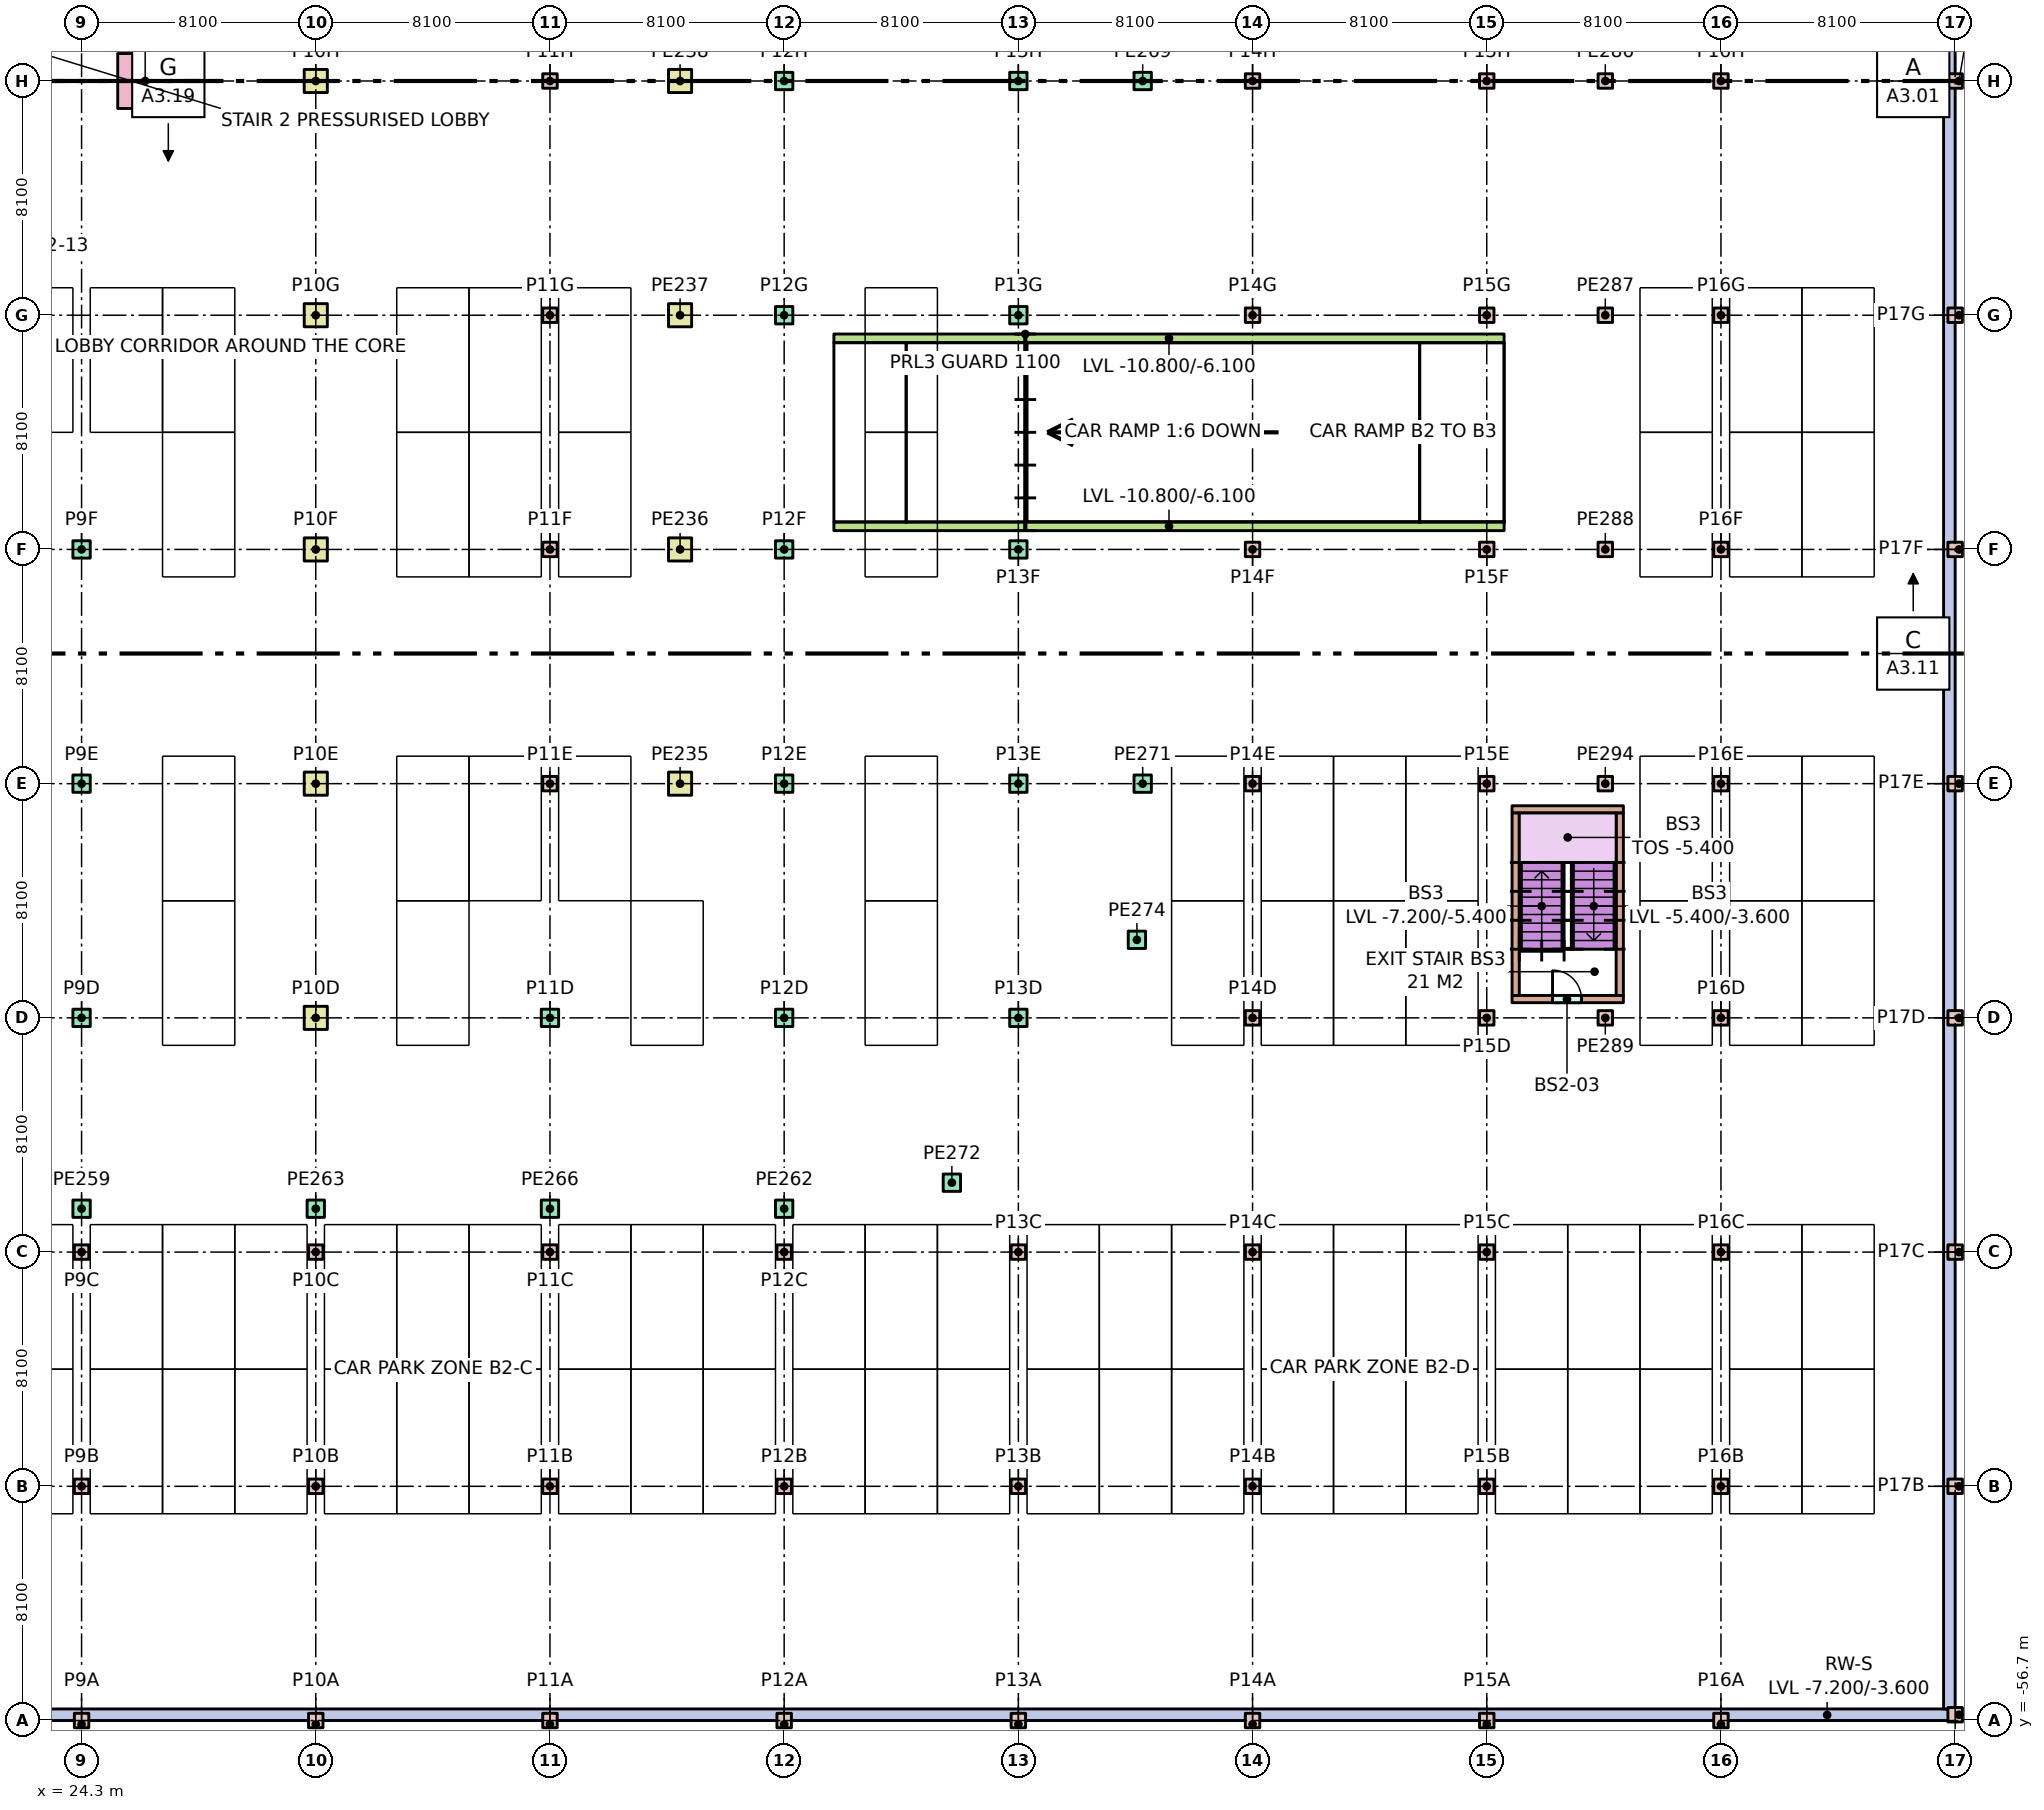
"""IFC4 building model, lengths in metres.
Left out: names, types, materials, properties, quantities, classifications, styles, units other than length and angle.
Written with IfcOpenShell. Run it as: python <this file> out.ifc"""

import sys

from ifc_helpers import new_model, si_unit, direction, frame, frame_2d, origin, origin_2d, place, context, subcontext, project, spatial, polyline, rectangle, outline, extrude, element, fill, save


model = new_model("IFC4")
c1 = context("Model", 3, precision=1e-05, world=origin(), true_north=direction((0.0, 1.0)))
c2 = subcontext(c1, "Body", "Model", "MODEL_VIEW")
j1 = project(units=[si_unit("LENGTHUNIT", "METRE"), si_unit("PLANEANGLEUNIT", "RADIAN")], contexts=[c1])
p1 = place(None, origin())
s1 = spatial("IfcSite", under=j1, at=p1, CompositionType="ELEMENT")
p2 = place(p1, origin())
s2 = spatial("IfcBuilding", under=s1, at=p2, CompositionType="ELEMENT")
p3 = place(p2, frame((0.0, 0.0, -7.2)))
s3 = spatial("IfcBuildingStorey", under=s2, at=p3, CompositionType="ELEMENT", Elevation=-7.2)
p4 = place(p3, frame((-40.5, -56.5, 0.0), z_axis=(0.0, 0.0, 1.0), x_axis=(1.0, 0.0, 0.0)))
e1 = element("IfcWall", 1, at=p4, inside=s3, PredefinedType="SOLIDWALL", context=c2, shape_type="SweptSolid", body=[
    extrude(rectangle(XDim=129.6, YDim=0.4, at=frame_2d((64.8, 0.0))), origin(), (0.0, 0.0, 1.0), 3.6),
])
p5 = place(p3, frame((88.9, -56.3, 0.0), z_axis=(0.0, 0.0, 1.0), x_axis=(0.0, 1.0, 0.0)))
e2 = element("IfcWall", 2, at=p5, inside=s3, PredefinedType="SOLIDWALL", context=c2, shape_type="SweptSolid", body=[
    extrude(rectangle(XDim=112.6, YDim=0.4, at=frame_2d((56.3, 0.0))), origin(), (0.0, 0.0, 1.0), 3.6),
])
for number, where, z_axis, x_axis in (
    (3, (24.3, -56.7, 0.0), (0.0, 0.0, 1.0), (1.0, 0.0, 0.0)),
    (4, (24.3, -48.6, 0.0), (0.0, 0.0, 1.0), (1.0, 0.0, 0.0)),
    (5, (24.3, -40.5, 0.0), (0.0, 0.0, 1.0), (1.0, 0.0, 0.0)),
):
    element("IfcColumn", number, at=place(p3, frame(where, z_axis=z_axis, x_axis=x_axis)), inside=s3, PredefinedType="COLUMN", context=c2, shape_type="SweptSolid", body=[
        extrude(rectangle(XDim=0.5, YDim=0.5, at=origin_2d()), origin(), (0.0, 0.0, 1.0), 3.6),
    ])
for number, where, z_axis, x_axis in (
    (6, (24.3, -32.4, 0.0), (0.0, 0.0, 1.0), (1.0, 0.0, 0.0)),
    (7, (24.3, -24.3, 0.0), (0.0, 0.0, 1.0), (1.0, 0.0, 0.0)),
    (8, (24.3, -16.2, 0.0), (0.0, 0.0, 1.0), (1.0, 0.0, 0.0)),
):
    element("IfcColumn", number, at=place(p3, frame(where, z_axis=z_axis, x_axis=x_axis)), inside=s3, PredefinedType="COLUMN", context=c2, shape_type="SweptSolid", body=[
        extrude(rectangle(XDim=0.6, YDim=0.6, at=origin_2d()), origin(), (0.0, 0.0, 1.0), 3.6),
    ])
for number, where, z_axis, x_axis in (
    (9, (32.4, -56.7, 0.0), (0.0, 0.0, 1.0), (1.0, 0.0, 0.0)),
    (10, (32.4, -48.6, 0.0), (0.0, 0.0, 1.0), (1.0, 0.0, 0.0)),
    (11, (32.4, -40.5, 0.0), (0.0, 0.0, 1.0), (1.0, 0.0, 0.0)),
):
    element("IfcColumn", number, at=place(p3, frame(where, z_axis=z_axis, x_axis=x_axis)), inside=s3, PredefinedType="COLUMN", context=c2, shape_type="SweptSolid", body=[
        extrude(rectangle(XDim=0.5, YDim=0.5, at=origin_2d()), origin(), (0.0, 0.0, 1.0), 3.6),
    ])
for number, where, z_axis, x_axis in (
    (12, (32.4, -32.4, 0.0), (0.0, 0.0, 1.0), (1.0, 0.0, 0.0)),
    (13, (32.4, -24.3, 0.0), (0.0, 0.0, 1.0), (1.0, 0.0, 0.0)),
    (14, (32.4, -16.2, 0.0), (0.0, 0.0, 1.0), (1.0, 0.0, 0.0)),
    (15, (32.4, -8.1, 0.0), (0.0, 0.0, 1.0), (1.0, 0.0, 0.0)),
    (16, (32.4, 0.0, 0.0), (0.0, 0.0, 1.0), (1.0, 0.0, 0.0)),
):
    element("IfcColumn", number, at=place(p3, frame(where, z_axis=z_axis, x_axis=x_axis)), inside=s3, PredefinedType="COLUMN", context=c2, shape_type="SweptSolid", body=[
        extrude(rectangle(XDim=0.8, YDim=0.8, at=origin_2d()), origin(), (0.0, 0.0, 1.0), 3.6),
    ])
for number, where, z_axis, x_axis in (
    (17, (40.5, -56.7, 0.0), (0.0, 0.0, 1.0), (1.0, 0.0, 0.0)),
    (18, (40.5, -48.6, 0.0), (0.0, 0.0, 1.0), (1.0, 0.0, 0.0)),
    (19, (40.5, -40.5, 0.0), (0.0, 0.0, 1.0), (1.0, 0.0, 0.0)),
):
    element("IfcColumn", number, at=place(p3, frame(where, z_axis=z_axis, x_axis=x_axis)), inside=s3, PredefinedType="COLUMN", context=c2, shape_type="SweptSolid", body=[
        extrude(rectangle(XDim=0.5, YDim=0.5, at=origin_2d()), origin(), (0.0, 0.0, 1.0), 3.6),
    ])
p6 = place(p3, frame((40.5, -32.4, 0.0), z_axis=(0.0, 0.0, 1.0), x_axis=(1.0, 0.0, 0.0)))
e20 = element("IfcColumn", 20, at=p6, inside=s3, PredefinedType="COLUMN", context=c2, shape_type="SweptSolid", body=[
    extrude(rectangle(XDim=0.6, YDim=0.6, at=origin_2d()), origin(), (0.0, 0.0, 1.0), 3.6),
])
for number, where, z_axis, x_axis in (
    (21, (40.5, -24.3, 0.0), (0.0, 0.0, 1.0), (1.0, 0.0, 0.0)),
    (22, (40.5, -16.2, 0.0), (0.0, 0.0, 1.0), (1.0, 0.0, 0.0)),
    (23, (40.5, -8.1, 0.0), (0.0, 0.0, 1.0), (1.0, 0.0, 0.0)),
    (24, (40.5, 0.0, 0.0), (0.0, 0.0, 1.0), (1.0, 0.0, 0.0)),
    (25, (48.6, -56.7, 0.0), (0.0, 0.0, 1.0), (1.0, 0.0, 0.0)),
    (26, (48.6, -48.6, 0.0), (0.0, 0.0, 1.0), (1.0, 0.0, 0.0)),
    (27, (48.6, -40.5, 0.0), (0.0, 0.0, 1.0), (1.0, 0.0, 0.0)),
):
    element("IfcColumn", number, at=place(p3, frame(where, z_axis=z_axis, x_axis=x_axis)), inside=s3, PredefinedType="COLUMN", context=c2, shape_type="SweptSolid", body=[
        extrude(rectangle(XDim=0.5, YDim=0.5, at=origin_2d()), origin(), (0.0, 0.0, 1.0), 3.6),
    ])
for number, where, z_axis, x_axis in (
    (28, (48.6, -32.4, 0.0), (0.0, 0.0, 1.0), (1.0, 0.0, 0.0)),
    (29, (48.6, -24.3, 0.0), (0.0, 0.0, 1.0), (1.0, 0.0, 0.0)),
    (30, (48.6, -16.2, 0.0), (0.0, 0.0, 1.0), (1.0, 0.0, 0.0)),
    (31, (48.6, -8.1, 0.0), (0.0, 0.0, 1.0), (1.0, 0.0, 0.0)),
    (32, (48.6, 0.0, 0.0), (0.0, 0.0, 1.0), (1.0, 0.0, 0.0)),
):
    element("IfcColumn", number, at=place(p3, frame(where, z_axis=z_axis, x_axis=x_axis)), inside=s3, PredefinedType="COLUMN", context=c2, shape_type="SweptSolid", body=[
        extrude(rectangle(XDim=0.6, YDim=0.6, at=origin_2d()), origin(), (0.0, 0.0, 1.0), 3.6),
    ])
for number, where, z_axis, x_axis in (
    (33, (56.7, -56.7, 0.0), (0.0, 0.0, 1.0), (1.0, 0.0, 0.0)),
    (34, (56.7, -48.6, 0.0), (0.0, 0.0, 1.0), (1.0, 0.0, 0.0)),
    (35, (56.7, -40.5, 0.0), (0.0, 0.0, 1.0), (1.0, 0.0, 0.0)),
):
    element("IfcColumn", number, at=place(p3, frame(where, z_axis=z_axis, x_axis=x_axis)), inside=s3, PredefinedType="COLUMN", context=c2, shape_type="SweptSolid", body=[
        extrude(rectangle(XDim=0.5, YDim=0.5, at=origin_2d()), origin(), (0.0, 0.0, 1.0), 3.6),
    ])
for number, where, z_axis, x_axis in (
    (36, (56.7, -32.4, 0.0), (0.0, 0.0, 1.0), (1.0, 0.0, 0.0)),
    (37, (56.7, -24.3, 0.0), (0.0, 0.0, 1.0), (1.0, 0.0, 0.0)),
    (38, (56.7, -16.2, 0.0), (0.0, 0.0, 1.0), (1.0, 0.0, 0.0)),
    (39, (56.7, -8.1, 0.0), (0.0, 0.0, 1.0), (1.0, 0.0, 0.0)),
    (40, (56.7, 0.0, 0.0), (0.0, 0.0, 1.0), (1.0, 0.0, 0.0)),
):
    element("IfcColumn", number, at=place(p3, frame(where, z_axis=z_axis, x_axis=x_axis)), inside=s3, PredefinedType="COLUMN", context=c2, shape_type="SweptSolid", body=[
        extrude(rectangle(XDim=0.6, YDim=0.6, at=origin_2d()), origin(), (0.0, 0.0, 1.0), 3.6),
    ])
for number, where, z_axis, x_axis in (
    (41, (64.8, -56.7, 0.0), (0.0, 0.0, 1.0), (1.0, 0.0, 0.0)),
    (42, (64.8, -48.6, 0.0), (0.0, 0.0, 1.0), (1.0, 0.0, 0.0)),
    (43, (64.8, -40.5, 0.0), (0.0, 0.0, 1.0), (1.0, 0.0, 0.0)),
    (44, (64.8, -32.4, 0.0), (0.0, 0.0, 1.0), (1.0, 0.0, 0.0)),
    (45, (64.8, -24.3, 0.0), (0.0, 0.0, 1.0), (1.0, 0.0, 0.0)),
    (46, (64.8, -16.2, 0.0), (0.0, 0.0, 1.0), (1.0, 0.0, 0.0)),
    (47, (64.8, -8.1, 0.0), (0.0, 0.0, 1.0), (1.0, 0.0, 0.0)),
    (48, (64.8, 0.0, 0.0), (0.0, 0.0, 1.0), (1.0, 0.0, 0.0)),
    (49, (72.9, -56.7, 0.0), (0.0, 0.0, 1.0), (1.0, 0.0, 0.0)),
    (50, (72.9, -48.6, 0.0), (0.0, 0.0, 1.0), (1.0, 0.0, 0.0)),
    (51, (72.9, -40.5, 0.0), (0.0, 0.0, 1.0), (1.0, 0.0, 0.0)),
    (52, (72.9, -32.4, 0.0), (0.0, 0.0, 1.0), (1.0, 0.0, 0.0)),
    (53, (72.9, -24.3, 0.0), (0.0, 0.0, 1.0), (1.0, 0.0, 0.0)),
    (54, (72.9, -16.2, 0.0), (0.0, 0.0, 1.0), (1.0, 0.0, 0.0)),
    (55, (72.9, -8.1, 0.0), (0.0, 0.0, 1.0), (1.0, 0.0, 0.0)),
    (56, (72.9, 0.0, 0.0), (0.0, 0.0, 1.0), (1.0, 0.0, 0.0)),
    (57, (81.0, -56.7, 0.0), (0.0, 0.0, 1.0), (1.0, 0.0, 0.0)),
    (58, (81.0, -48.6, 0.0), (0.0, 0.0, 1.0), (1.0, 0.0, 0.0)),
    (59, (81.0, -40.5, 0.0), (0.0, 0.0, 1.0), (1.0, 0.0, 0.0)),
    (60, (81.0, -32.4, 0.0), (0.0, 0.0, 1.0), (1.0, 0.0, 0.0)),
    (61, (81.0, -24.3, 0.0), (0.0, 0.0, 1.0), (1.0, 0.0, 0.0)),
    (62, (81.0, -16.2, 0.0), (0.0, 0.0, 1.0), (1.0, 0.0, 0.0)),
    (63, (81.0, -8.1, 0.0), (0.0, 0.0, 1.0), (1.0, 0.0, 0.0)),
    (64, (81.0, 0.0, 0.0), (0.0, 0.0, 1.0), (1.0, 0.0, 0.0)),
    (65, (89.1, -56.5, 0.0), (0.0, 0.0, 1.0), (1.0, 0.0, 0.0)),
    (66, (89.1, -48.6, 0.0), (0.0, 0.0, 1.0), (1.0, 0.0, 0.0)),
    (67, (89.1, -40.5, 0.0), (0.0, 0.0, 1.0), (1.0, 0.0, 0.0)),
    (68, (89.1, -32.4, 0.0), (0.0, 0.0, 1.0), (1.0, 0.0, 0.0)),
    (69, (89.1, -24.3, 0.0), (0.0, 0.0, 1.0), (1.0, 0.0, 0.0)),
    (70, (89.1, -16.2, 0.0), (0.0, 0.0, 1.0), (1.0, 0.0, 0.0)),
    (71, (89.1, -8.1, 0.0), (0.0, 0.0, 1.0), (1.0, 0.0, 0.0)),
    (72, (89.1, 0.0, 0.0), (0.0, 0.0, 1.0), (1.0, 0.0, 0.0)),
):
    element("IfcColumn", number, at=place(p3, frame(where, z_axis=z_axis, x_axis=x_axis)), inside=s3, PredefinedType="COLUMN", context=c2, shape_type="SweptSolid", body=[
        extrude(rectangle(XDim=0.5, YDim=0.5, at=origin_2d()), origin(), (0.0, 0.0, 1.0), 3.6),
    ])
for number, where, z_axis, x_axis in (
    (73, (45.0, -24.3, 0.0), (0.0, 0.0, 1.0), (1.0, 0.0, 0.0)),
    (74, (45.0, -16.2, 0.0), (0.0, 0.0, 1.0), (1.0, 0.0, 0.0)),
    (75, (45.0, -8.1, 0.0), (0.0, 0.0, 1.0), (1.0, 0.0, 0.0)),
    (76, (45.0, 0.0, 0.0), (0.0, 0.0, 1.0), (1.0, 0.0, 0.0)),
):
    element("IfcColumn", number, at=place(p3, frame(where, z_axis=z_axis, x_axis=x_axis)), inside=s3, PredefinedType="COLUMN", context=c2, shape_type="SweptSolid", body=[
        extrude(rectangle(XDim=0.8, YDim=0.8, at=origin_2d()), origin(), (0.0, 0.0, 1.0), 3.6),
    ])
for number, where, z_axis, x_axis in (
    (77, (24.3, -39.0, 0.0), (0.0, 0.0, 1.0), (1.0, 0.0, 0.0)),
    (78, (48.6, -39.0, 0.0), (0.0, 0.0, 1.0), (1.0, 0.0, 0.0)),
    (79, (32.4, -39.0, 0.0), (0.0, 0.0, 1.0), (1.0, 0.0, 0.0)),
    (80, (40.5, -39.0, 0.0), (0.0, 0.0, 1.0), (1.0, 0.0, 0.0)),
    (81, (61.0, 0.0, 0.0), (0.0, 0.0, 1.0), (1.0, 0.0, 0.0)),
    (82, (61.0, -24.3, 0.0), (0.0, 0.0, 1.0), (1.0, 0.0, 0.0)),
    (83, (54.4, -38.1, 0.0), (0.0, 0.0, 1.0), (1.0, 0.0, 0.0)),
    (84, (60.8, -29.7, 0.0), (0.0, 0.0, 1.0), (1.0, 0.0, 0.0)),
):
    element("IfcColumn", number, at=place(p3, frame(where, z_axis=z_axis, x_axis=x_axis)), inside=s3, PredefinedType="COLUMN", context=c2, shape_type="SweptSolid", body=[
        extrude(rectangle(XDim=0.6, YDim=0.6, at=origin_2d()), origin(), (0.0, 0.0, 1.0), 3.6),
    ])
for number, where, z_axis, x_axis in (
    (85, (77.0, 0.0, 0.0), (0.0, 0.0, 1.0), (1.0, 0.0, 0.0)),
    (86, (77.0, -8.1, 0.0), (0.0, 0.0, 1.0), (1.0, 0.0, 0.0)),
    (87, (77.0, -16.2, 0.0), (0.0, 0.0, 1.0), (1.0, 0.0, 0.0)),
    (88, (77.0, -32.4, 0.0), (0.0, 0.0, 1.0), (1.0, 0.0, 0.0)),
    (89, (77.0, -24.3, 0.0), (0.0, 0.0, 1.0), (1.0, 0.0, 0.0)),
):
    element("IfcColumn", number, at=place(p3, frame(where, z_axis=z_axis, x_axis=x_axis)), inside=s3, PredefinedType="COLUMN", context=c2, shape_type="SweptSolid", body=[
        extrude(rectangle(XDim=0.5, YDim=0.5, at=origin_2d()), origin(), (0.0, 0.0, 1.0), 3.6),
    ])
p7 = place(p3, frame((26.5, 0.0, 0.0), z_axis=(0.0, 0.0, 1.0), x_axis=(0.0, 1.0, 0.0)))
e90 = element("IfcColumn", 90, at=p7, inside=s3, PredefinedType="COLUMN", context=c2, shape_type="SweptSolid", body=[
    extrude(rectangle(XDim=1.9, YDim=1.9, at=origin_2d()), origin(), (0.0, 0.0, 1.0), 3.6),
])
p8 = place(p3, frame((73.775, -31.75, 0.0), z_axis=(0.0, 0.0, 1.0), x_axis=(1.0, 0.0, 0.0)))
e91 = element("IfcWall", 91, at=p8, inside=s3, PredefinedType="STANDARD", context=c2, shape_type="SweptSolid", body=[
    extrude(rectangle(XDim=3.85, YDim=0.25, at=frame_2d((1.925, 0.0))), origin(), (0.0, 0.0, 1.0), 3.28),
])
p9 = place(p8, frame((1.4, 0.0, 0.0)))
e92 = element("IfcOpeningElement", 92, at=p9, cuts=e91, PredefinedType="OPENING", context=c2, shape_type="SweptSolid", body=[
    extrude(rectangle(XDim=1.0, YDim=2.1, at=frame_2d((0.5, 1.05))), frame((0.0, 0.135, 0.0), z_axis=(0.0, -1.0, 0.0), x_axis=(1.0, 0.0, 0.0)), (0.0, 0.0, 1.0), 0.27),
])
p10 = place(p3, frame((73.775, -25.19, 0.0), z_axis=(0.0, 0.0, 1.0), x_axis=(1.0, 0.0, 0.0)))
e93 = element("IfcWall", 93, at=p10, inside=s3, PredefinedType="STANDARD", context=c2, shape_type="SweptSolid", body=[
    extrude(rectangle(XDim=3.85, YDim=0.25, at=frame_2d((1.925, 0.0))), origin(), (0.0, 0.0, 1.0), 3.28),
])
for number, where, z_axis, x_axis in (
    (94, (73.9, -31.625, 0.0), (0.0, 0.0, 1.0), (0.0, 1.0, 0.0)),
    (95, (77.5, -31.625, 0.0), (0.0, 0.0, 1.0), (0.0, 1.0, 0.0)),
):
    element("IfcWall", number, at=place(p3, frame(where, z_axis=z_axis, x_axis=x_axis)), inside=s3, PredefinedType="STANDARD", context=c2, shape_type="SweptSolid", body=[
        extrude(rectangle(XDim=6.31, YDim=0.25, at=frame_2d((3.155, 0.0))), origin(), (0.0, 0.0, 1.0), 3.28),
    ])
for number, where, z_axis, x_axis in (
    (96, (73.5, -15.4, -3.6), (0.0, 0.0, 1.0), (-1.0, 0.0, 0.0)),
    (97, (73.5, -8.9, -3.6), (0.0, 0.0, 1.0), (-1.0, 0.0, 0.0)),
):
    element("IfcWall", number, at=place(p3, frame(where, z_axis=z_axis, x_axis=x_axis)), inside=s3, PredefinedType="STANDARD", context=c2, shape_type="SweptSolid", body=[
        extrude(outline(polyline([(0.0, 0.0), (23.18, 0.0), (23.18, 3.28), (16.502, 3.28), (16.5, 4.7), (0.0, 4.7), (0.0, 0.0)])), frame((0.0, 0.15, 0.0), z_axis=(0.0, -1.0, 0.0), x_axis=(1.0, 0.0, 0.0)), (0.0, 0.0, 1.0), 0.3),
    ])
p11 = place(p9, origin())
e98 = element("IfcDoor", 98, at=p11, inside=s3, OperationType="SINGLE_SWING_LEFT", PredefinedType="DOOR", context=c2, shape_type="SweptSolid", body=[
    extrude(rectangle(XDim=1.0, YDim=2.1, at=frame_2d((0.5, 1.05))), frame((0.0, 0.025, 0.0), z_axis=(0.0, -1.0, 0.0), x_axis=(1.0, 0.0, 0.0)), (0.0, 0.0, 1.0), 0.05),
])
fill(e92, e98)
save(model, sys.argv[1])
